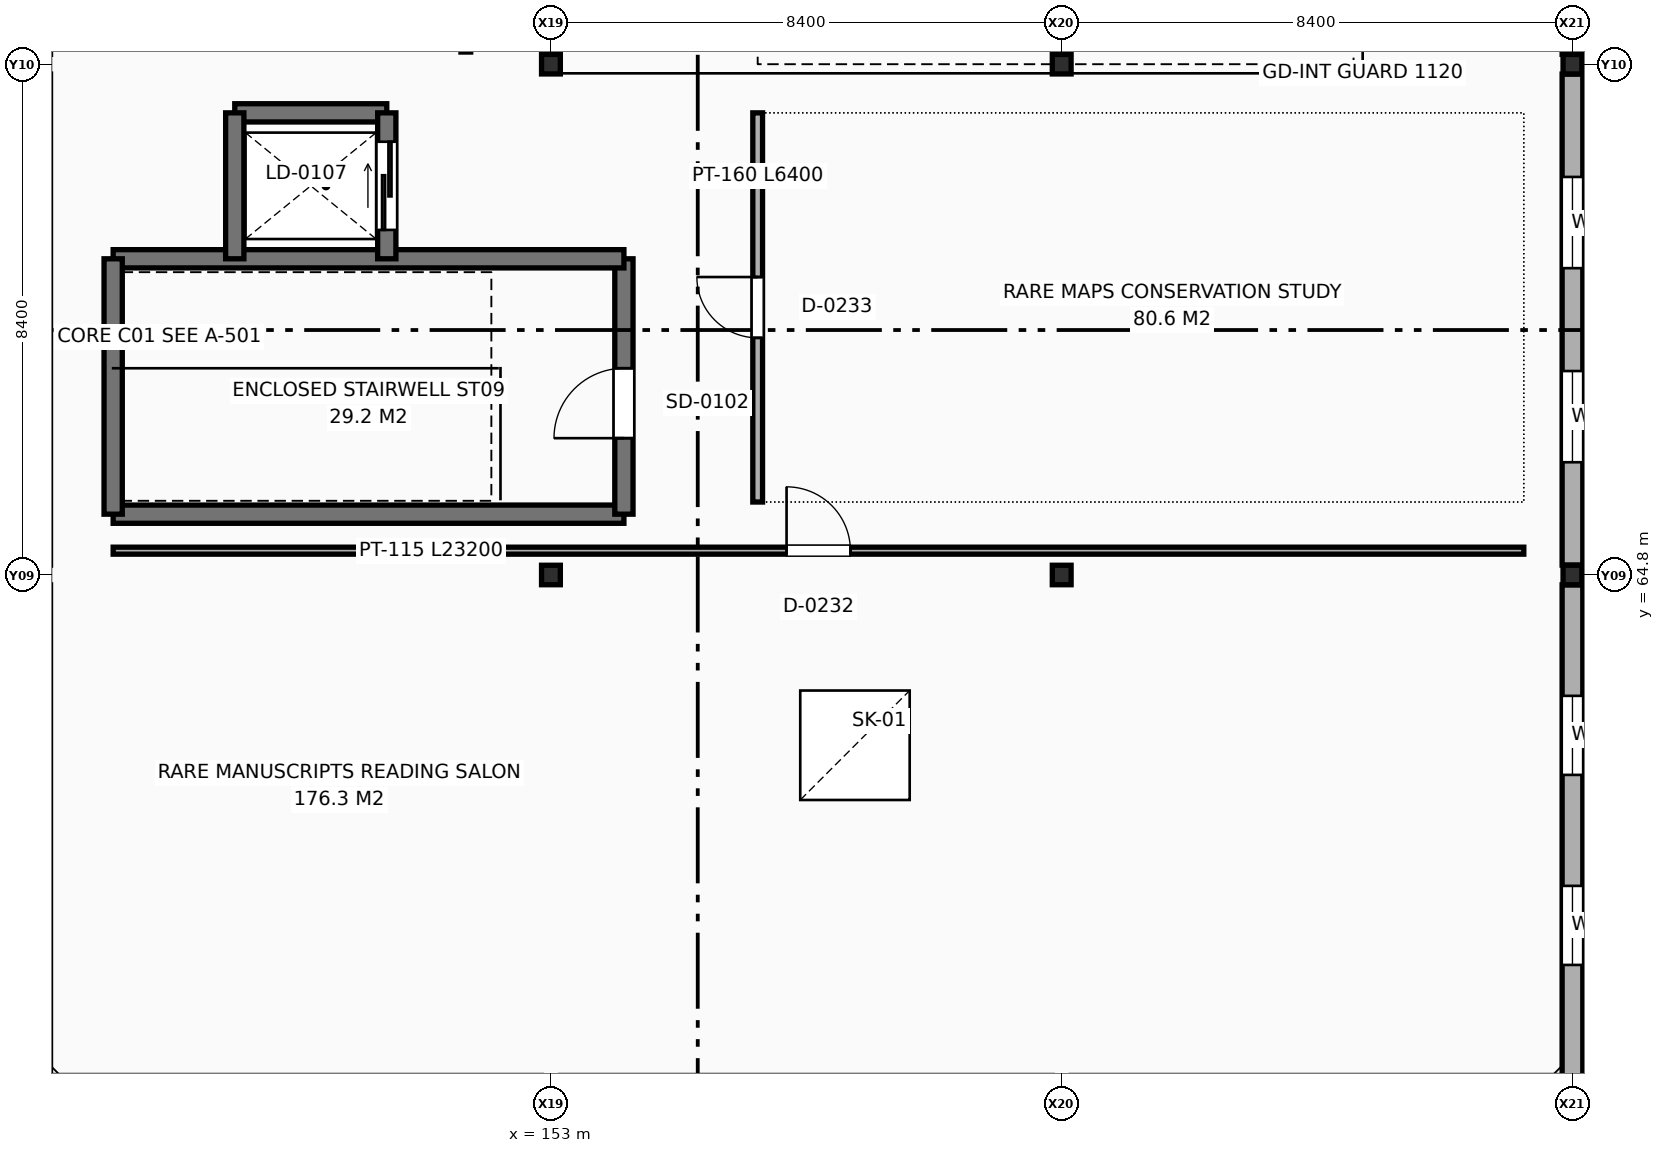
"""IFC4 building model, lengths in metres.
Left out: names, types, materials, properties, quantities, classifications, styles, units other than length and angle.
Written with IfcOpenShell. Run it as: python <this file> out.ifc"""

import sys

from ifc_helpers import new_model, si_unit, direction, frame, frame_2d, origin, origin_2d, place, context, subcontext, project, spatial, rectangle, i_section, extrude, element, fill, save


model = new_model("IFC4")
c1 = context("Model", 3, precision=1e-05, world=origin(), true_north=direction((0.0, 1.0)))
c2 = subcontext(c1, "Body", "Model", "MODEL_VIEW")
j1 = project(units=[si_unit("LENGTHUNIT", "METRE"), si_unit("PLANEANGLEUNIT", "RADIAN")], contexts=[c1])
p1 = place(None, origin())
s1 = spatial("IfcSite", under=j1, at=p1, CompositionType="ELEMENT")
p2 = place(p1, origin())
s2 = spatial("IfcBuilding", under=s1, at=p2, CompositionType="ELEMENT")
p3 = place(p2, frame((0.0, 0.0, 13.8)))
s3 = spatial("IfcBuildingStorey", under=s2, at=p3, CompositionType="ELEMENT", Elevation=13.8)
for number, where, z_axis, x_axis in (
    (1, (153.0, 64.8, 0.0), (0.0, 0.0, 1.0), (1.0, 0.0, 0.0)),
    (2, (153.0, 73.2, 0.0), (0.0, 0.0, 1.0), (1.0, 0.0, 0.0)),
    (3, (161.4, 64.8, 0.0), (0.0, 0.0, 1.0), (1.0, 0.0, 0.0)),
    (4, (161.4, 73.2, 0.0), (0.0, 0.0, 1.0), (1.0, 0.0, 0.0)),
    (5, (169.8, 64.8, 0.0), (0.0, 0.0, 1.0), (1.0, 0.0, 0.0)),
    (6, (169.8, 73.2, 0.0), (0.0, 0.0, 1.0), (1.0, 0.0, 0.0)),
):
    element("IfcColumn", number, at=place(p3, frame(where, z_axis=z_axis, x_axis=x_axis)), inside=s3, PredefinedType="COLUMN", context=c2, shape_type="SweptSolid", body=[
        extrude(i_section(OverallWidth=0.309, OverallDepth=0.321, WebThickness=0.014, FlangeThickness=0.022, FilletRadius=0.015, at=origin_2d()), origin(), (0.0, 0.0, 1.0), 4.2),
    ])
p4 = place(p3, frame((169.8, 56.562, 0.0), z_axis=(0.0, 0.0, 1.0), x_axis=(0.0, 1.0, 0.0)))
e7 = element("IfcWall", 7, at=p4, inside=s3, PredefinedType="SOLIDWALL", context=c2, shape_type="SweptSolid", body=[
    extrude(rectangle(XDim=8.075, YDim=0.34, at=frame_2d((4.038, 0.0))), origin(), (0.0, 0.0, 1.0), 3.18),
])
p5 = place(p4, frame((1.825, 0.0, 0.9)))
e8 = element("IfcOpeningElement", 8, at=p5, cuts=e7, PredefinedType="OPENING", context=c2, shape_type="SweptSolid", body=[
    extrude(rectangle(XDim=1.3, YDim=1.8, at=frame_2d((0.65, 0.9))), frame((0.0, 0.18, 0.0), z_axis=(0.0, -1.0, 0.0), x_axis=(1.0, 0.0, 0.0)), (0.0, 0.0, 1.0), 0.36),
])
p6 = place(p4, frame((4.95, 0.0, 0.9)))
e9 = element("IfcOpeningElement", 9, at=p6, cuts=e7, PredefinedType="OPENING", context=c2, shape_type="SweptSolid", body=[
    extrude(rectangle(XDim=1.3, YDim=1.8, at=frame_2d((0.65, 0.9))), frame((0.0, 0.18, 0.0), z_axis=(0.0, -1.0, 0.0), x_axis=(1.0, 0.0, 0.0)), (0.0, 0.0, 1.0), 0.36),
])
p7 = place(p3, frame((169.8, 64.962, 0.0), z_axis=(0.0, 0.0, 1.0), x_axis=(0.0, 1.0, 0.0)))
e10 = element("IfcWall", 10, at=p7, inside=s3, PredefinedType="SOLIDWALL", context=c2, shape_type="SweptSolid", body=[
    extrude(rectangle(XDim=8.075, YDim=0.34, at=frame_2d((4.038, 0.0))), origin(), (0.0, 0.0, 1.0), 3.18),
])
p8 = place(p7, frame((1.692, 0.0, 0.9)))
e11 = element("IfcOpeningElement", 11, at=p8, cuts=e10, PredefinedType="OPENING", context=c2, shape_type="SweptSolid", body=[
    extrude(rectangle(XDim=1.5, YDim=1.8, at=frame_2d((0.75, 0.9))), frame((0.0, 0.18, 0.0), z_axis=(0.0, -1.0, 0.0), x_axis=(1.0, 0.0, 0.0)), (0.0, 0.0, 1.0), 0.36),
])
p9 = place(p7, frame((4.884, 0.0, 0.9)))
e12 = element("IfcOpeningElement", 12, at=p9, cuts=e10, PredefinedType="OPENING", context=c2, shape_type="SweptSolid", body=[
    extrude(rectangle(XDim=1.5, YDim=1.8, at=frame_2d((0.75, 0.9))), frame((0.0, 0.18, 0.0), z_axis=(0.0, -1.0, 0.0), x_axis=(1.0, 0.0, 0.0)), (0.0, 0.0, 1.0), 0.36),
])
p10 = place(p3, frame((169.8, 73.362, 0.0), z_axis=(0.0, 0.0, 1.0), x_axis=(0.0, 1.0, 0.0)))
e13 = element("IfcWall", 13, at=p10, inside=s3, PredefinedType="SOLIDWALL", context=c2, shape_type="SweptSolid", body=[
    extrude(rectangle(XDim=8.075, YDim=0.34, at=frame_2d((4.038, 0.0))), origin(), (0.0, 0.0, 1.0), 3.18),
])
p11 = place(p10, frame((1.525, 0.0, 0.9)))
e14 = element("IfcOpeningElement", 14, at=p11, cuts=e13, PredefinedType="OPENING", context=c2, shape_type="SweptSolid", body=[
    extrude(rectangle(XDim=1.75, YDim=1.8, at=frame_2d((0.875, 0.9))), frame((0.0, 0.18, 0.0), z_axis=(0.0, -1.0, 0.0), x_axis=(1.0, 0.0, 0.0)), (0.0, 0.0, 1.0), 0.36),
])
p12 = place(p10, frame((4.8, 0.0, 0.9)))
e15 = element("IfcOpeningElement", 15, at=p12, cuts=e13, PredefinedType="OPENING", context=c2, shape_type="SweptSolid", body=[
    extrude(rectangle(XDim=1.75, YDim=1.8, at=frame_2d((0.875, 0.9))), frame((0.0, 0.18, 0.0), z_axis=(0.0, -1.0, 0.0), x_axis=(1.0, 0.0, 0.0)), (0.0, 0.0, 1.0), 0.36),
])
p13 = place(p3, frame((145.8, 65.8, 0.0), z_axis=(0.0, 0.0, 1.0), x_axis=(1.0, 0.0, 0.0)))
e16 = element("IfcWall", 16, at=p13, inside=s3, PredefinedType="SHEAR", context=c2, shape_type="SweptSolid", body=[
    extrude(rectangle(XDim=8.4, YDim=0.3, at=frame_2d((4.2, 0.0))), origin(), (0.0, 0.0, 1.0), 3.92),
])
p14 = place(p3, frame((154.2, 65.8, 0.0), z_axis=(0.0, 0.0, 1.0), x_axis=(0.0, 1.0, 0.0)))
e17 = element("IfcWall", 17, at=p14, inside=s3, PredefinedType="SHEAR", context=c2, shape_type="SweptSolid", body=[
    extrude(rectangle(XDim=4.2, YDim=0.3, at=frame_2d((2.1, 0.0))), origin(), (0.0, 0.0, 1.0), 3.92),
])
p15 = place(p14, frame((1.25, 0.0, 0.0)))
e18 = element("IfcOpeningElement", 18, at=p15, cuts=e17, PredefinedType="OPENING", context=c2, shape_type="SweptSolid", body=[
    extrude(rectangle(XDim=1.15, YDim=2.2, at=frame_2d((0.575, 1.1))), frame((0.0, 0.16, 0.0), z_axis=(0.0, -1.0, 0.0), x_axis=(1.0, 0.0, 0.0)), (0.0, 0.0, 1.0), 0.32),
])
p16 = place(p3, frame((154.2, 70.0, 0.0), z_axis=(0.0, 0.0, 1.0), x_axis=(-1.0, 0.0, 0.0)))
e19 = element("IfcWall", 19, at=p16, inside=s3, PredefinedType="SHEAR", context=c2, shape_type="SweptSolid", body=[
    extrude(rectangle(XDim=8.4, YDim=0.3, at=frame_2d((4.2, 0.0))), origin(), (0.0, 0.0, 1.0), 3.92),
])
p17 = place(p3, frame((145.8, 70.0, 0.0), z_axis=(0.0, 0.0, 1.0), x_axis=(0.0, -1.0, 0.0)))
e20 = element("IfcWall", 20, at=p17, inside=s3, PredefinedType="SHEAR", context=c2, shape_type="SweptSolid", body=[
    extrude(rectangle(XDim=4.2, YDim=0.3, at=frame_2d((2.1, 0.0))), origin(), (0.0, 0.0, 1.0), 3.92),
])
p18 = place(p3, frame((150.3, 72.4, 0.0), z_axis=(0.0, 0.0, 1.0), x_axis=(-1.0, 0.0, 0.0)))
e21 = element("IfcWall", 21, at=p18, inside=s3, PredefinedType="SHEAR", context=c2, shape_type="SweptSolid", body=[
    extrude(rectangle(XDim=2.5, YDim=0.3, at=frame_2d((1.25, 0.0))), origin(), (0.0, 0.0, 1.0), 3.92),
])
p19 = place(p3, frame((147.8, 72.4, 0.0), z_axis=(0.0, 0.0, 1.0), x_axis=(0.0, -1.0, 0.0)))
e22 = element("IfcWall", 22, at=p19, inside=s3, PredefinedType="SHEAR", context=c2, shape_type="SweptSolid", body=[
    extrude(rectangle(XDim=2.4, YDim=0.3, at=frame_2d((1.2, 0.0))), origin(), (0.0, 0.0, 1.0), 3.92),
])
p20 = place(p3, frame((150.3, 70.0, 0.0), z_axis=(0.0, 0.0, 1.0), x_axis=(0.0, 1.0, 0.0)))
e23 = element("IfcWall", 23, at=p20, inside=s3, PredefinedType="SHEAR", context=c2, shape_type="SweptSolid", body=[
    extrude(rectangle(XDim=2.4, YDim=0.3, at=frame_2d((1.2, 0.0))), origin(), (0.0, 0.0, 1.0), 3.92),
])
p21 = place(p20, frame((0.475, 0.0, 0.0)))
e24 = element("IfcOpeningElement", 24, at=p21, cuts=e23, PredefinedType="OPENING", context=c2, shape_type="SweptSolid", body=[
    extrude(rectangle(XDim=1.45, YDim=2.35, at=frame_2d((0.725, 1.175))), frame((0.0, 0.16, 0.0), z_axis=(0.0, -1.0, 0.0), x_axis=(1.0, 0.0, 0.0)), (0.0, 0.0, 1.0), 0.32),
])
p22 = place(p3, frame((145.8, 65.2, 0.0), z_axis=(0.0, 0.0, 1.0), x_axis=(1.0, 0.0, 0.0)))
e25 = element("IfcWall", 25, at=p22, inside=s3, PredefinedType="PARTITIONING", context=c2, shape_type="SweptSolid", body=[
    extrude(rectangle(XDim=23.2, YDim=0.115, at=frame_2d((11.6, 0.0))), origin(), (0.0, 0.0, 1.0), 2.88),
])
p23 = place(p22, frame((11.075, 0.0, 0.0)))
e26 = element("IfcOpeningElement", 26, at=p23, cuts=e25, PredefinedType="OPENING", context=c2, shape_type="SweptSolid", body=[
    extrude(rectangle(XDim=1.05, YDim=2.15, at=frame_2d((0.525, 1.075))), frame((0.0, 0.067, 0.0), z_axis=(0.0, -1.0, 0.0), x_axis=(1.0, 0.0, 0.0)), (0.0, 0.0, 1.0), 0.135),
])
p24 = place(p3, frame((156.4, 66.0, 0.0), z_axis=(0.0, 0.0, 1.0), x_axis=(0.0, 1.0, 0.0)))
e27 = element("IfcWall", 27, at=p24, inside=s3, PredefinedType="PARTITIONING", context=c2, shape_type="SweptSolid", body=[
    extrude(rectangle(XDim=6.4, YDim=0.16, at=frame_2d((3.2, 0.0))), origin(), (0.0, 0.0, 1.0), 3.86),
])
p25 = place(p24, frame((2.7, 0.0, 0.0)))
e28 = element("IfcOpeningElement", 28, at=p25, cuts=e27, PredefinedType="OPENING", context=c2, shape_type="SweptSolid", body=[
    extrude(rectangle(XDim=1.0, YDim=2.1, at=frame_2d((0.5, 1.05))), frame((0.0, 0.09, 0.0), z_axis=(0.0, -1.0, 0.0), x_axis=(1.0, 0.0, 0.0)), (0.0, 0.0, 1.0), 0.18),
])
p26 = place(p3, frame((151.6, 73.4, 0.0), z_axis=(0.0, 0.0, 1.0), x_axis=(0.0, 1.0, 0.0)))
e29 = element("IfcWall", 29, at=p26, inside=s3, PredefinedType="PARTITIONING", context=c2, shape_type="SweptSolid", body=[
    extrude(rectangle(XDim=16.8, YDim=0.16, at=frame_2d((8.4, 0.0))), origin(), (0.0, 0.0, 1.0), 3.86),
])
p27 = place(p26, frame((4.56, 0.0, 0.0)))
e30 = element("IfcOpeningElement", 30, at=p27, cuts=e29, PredefinedType="OPENING", context=c2, shape_type="SweptSolid", body=[
    extrude(rectangle(XDim=1.6, YDim=2.3, at=frame_2d((0.8, 1.15))), frame((0.0, 0.09, 0.0), z_axis=(0.0, -1.0, 0.0), x_axis=(1.0, 0.0, 0.0)), (0.0, 0.0, 1.0), 0.18),
])
p28 = place(p5, origin())
e31 = element("IfcWindow", 31, at=p28, inside=s3, PartitioningType="SINGLE_PANEL", PredefinedType="WINDOW", context=c2, shape_type="SweptSolid", body=[
    extrude(rectangle(XDim=1.3, YDim=1.8, at=frame_2d((0.65, 0.9))), frame((0.0, 0.03, 0.0), z_axis=(0.0, -1.0, 0.0), x_axis=(1.0, 0.0, 0.0)), (0.0, 0.0, 1.0), 0.06),
])
fill(e8, e31)
p29 = place(p6, origin())
e32 = element("IfcWindow", 32, at=p29, inside=s3, PartitioningType="SINGLE_PANEL", PredefinedType="WINDOW", context=c2, shape_type="SweptSolid", body=[
    extrude(rectangle(XDim=1.3, YDim=1.8, at=frame_2d((0.65, 0.9))), frame((0.0, 0.03, 0.0), z_axis=(0.0, -1.0, 0.0), x_axis=(1.0, 0.0, 0.0)), (0.0, 0.0, 1.0), 0.06),
])
fill(e9, e32)
p30 = place(p8, origin())
e33 = element("IfcWindow", 33, at=p30, inside=s3, PartitioningType="SINGLE_PANEL", PredefinedType="WINDOW", context=c2, shape_type="SweptSolid", body=[
    extrude(rectangle(XDim=1.5, YDim=1.8, at=frame_2d((0.75, 0.9))), frame((0.0, 0.03, 0.0), z_axis=(0.0, -1.0, 0.0), x_axis=(1.0, 0.0, 0.0)), (0.0, 0.0, 1.0), 0.06),
])
fill(e11, e33)
p31 = place(p9, origin())
e34 = element("IfcWindow", 34, at=p31, inside=s3, PartitioningType="SINGLE_PANEL", PredefinedType="WINDOW", context=c2, shape_type="SweptSolid", body=[
    extrude(rectangle(XDim=1.5, YDim=1.8, at=frame_2d((0.75, 0.9))), frame((0.0, 0.03, 0.0), z_axis=(0.0, -1.0, 0.0), x_axis=(1.0, 0.0, 0.0)), (0.0, 0.0, 1.0), 0.06),
])
fill(e12, e34)
p32 = place(p2, frame((0.0, 0.0, 30.6)))
p33 = place(p32, frame((0.0, 0.0, -12.87)))
p34 = place(p33, frame((158.0, 62.0, 0.0)))
p35 = place(p34, frame((0.0, 0.0, 0.11)))
e35 = element("IfcWindow", 35, at=p35, inside=s3, PartitioningType="SINGLE_PANEL", PredefinedType="SKYLIGHT", context=c2, shape_type="SweptSolid", body=[
    extrude(rectangle(XDim=1.8, YDim=1.8, at=origin_2d()), origin(), (0.0, 0.0, 1.0), 0.05),
])
p36 = place(p15, origin())
e36 = element("IfcDoor", 36, at=p36, inside=s3, OperationType="SINGLE_SWING_LEFT", PredefinedType="DOOR", context=c2, shape_type="SweptSolid", body=[
    extrude(rectangle(XDim=1.15, YDim=2.2, at=frame_2d((0.575, 1.1))), frame((0.0, 0.025, 0.0), z_axis=(0.0, -1.0, 0.0), x_axis=(1.0, 0.0, 0.0)), (0.0, 0.0, 1.0), 0.05),
])
fill(e18, e36)
p37 = place(p21, origin())
e37 = element("IfcDoor", 37, at=p37, inside=s3, OperationType="SLIDING_TO_LEFT", PredefinedType="DOOR", context=c2, shape_type="SweptSolid", body=[
    extrude(rectangle(XDim=1.45, YDim=2.35, at=frame_2d((0.725, 1.175))), frame((0.0, 0.025, 0.0), z_axis=(0.0, -1.0, 0.0), x_axis=(1.0, 0.0, 0.0)), (0.0, 0.0, 1.0), 0.05),
])
fill(e24, e37)
p38 = place(p23, origin())
e38 = element("IfcDoor", 38, at=p38, inside=s3, OperationType="SINGLE_SWING_LEFT", PredefinedType="DOOR", context=c2, shape_type="SweptSolid", body=[
    extrude(rectangle(XDim=1.05, YDim=2.15, at=frame_2d((0.525, 1.075))), frame((0.0, 0.025, 0.0), z_axis=(0.0, -1.0, 0.0), x_axis=(1.0, 0.0, 0.0)), (0.0, 0.0, 1.0), 0.05),
])
fill(e26, e38)
p39 = place(p25, origin())
e39 = element("IfcDoor", 39, at=p39, inside=s3, OperationType="SINGLE_SWING_RIGHT", PredefinedType="DOOR", context=c2, shape_type="SweptSolid", body=[
    extrude(rectangle(XDim=1.0, YDim=2.1, at=frame_2d((0.5, 1.05))), frame((0.0, 0.025, 0.0), z_axis=(0.0, -1.0, 0.0), x_axis=(1.0, 0.0, 0.0)), (0.0, 0.0, 1.0), 0.05),
])
fill(e28, e39)
save(model, sys.argv[1])
